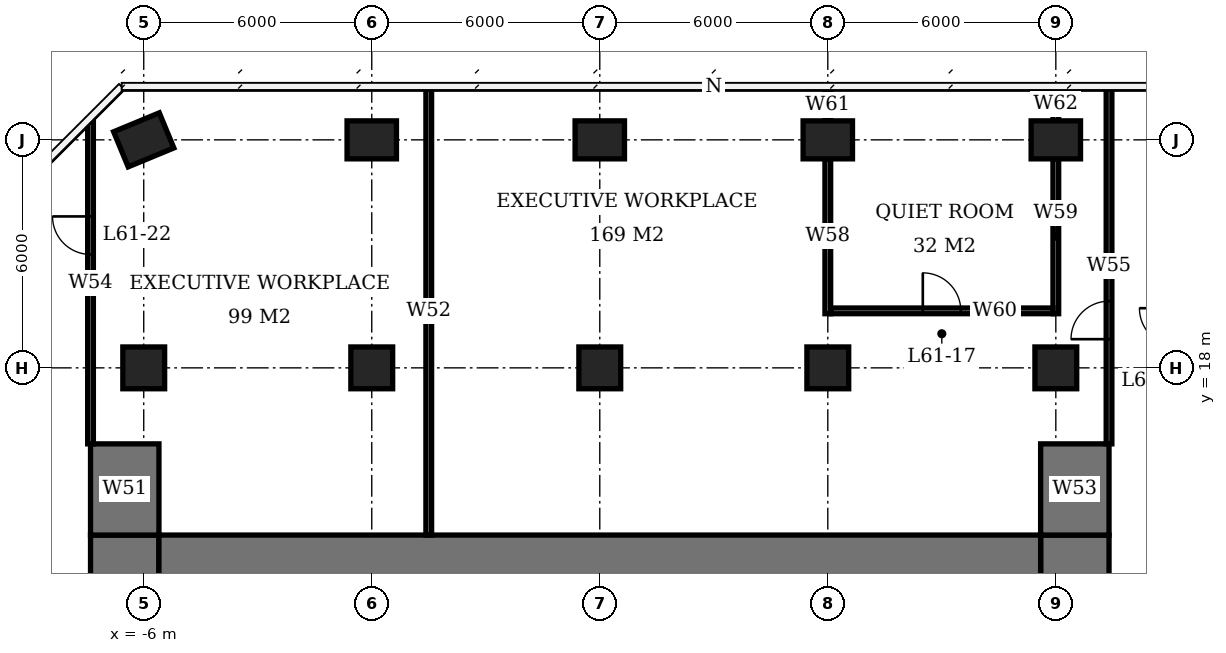
"""IFC4 building model, lengths in metres.
Left out: names, types, materials, properties, quantities, classifications, styles, units other than length and angle.
Written with IfcOpenShell. Run it as: python <this file> out.ifc"""

import sys

from ifc_helpers import new_model, si_unit, direction, frame, frame_2d, origin, origin_2d, place, context, subcontext, project, spatial, rectangle, extrude, element, fill, save


model = new_model("IFC4")
c1 = context("Model", 3, precision=1e-05, world=origin(), true_north=direction((0.0, 1.0)))
c2 = subcontext(c1, "Body", "Model", "MODEL_VIEW")
j1 = project(units=[si_unit("LENGTHUNIT", "METRE"), si_unit("PLANEANGLEUNIT", "RADIAN")], contexts=[c1])
p1 = place(None, origin())
s1 = spatial("IfcSite", under=j1, at=p1, CompositionType="ELEMENT")
p2 = place(p1, origin())
s2 = spatial("IfcBuilding", under=s1, at=p2, CompositionType="ELEMENT")
p3 = place(p2, frame((0.0, 0.0, 248.9)))
s3 = spatial("IfcBuildingStorey", under=s2, at=p3, CompositionType="ELEMENT", Elevation=248.9)
p4 = place(p3, frame((-6.0, 18.0, 0.0), z_axis=(0.0, 0.0, 1.0), x_axis=(1.0, 0.0, 0.0)))
e1 = element("IfcColumn", 1, at=p4, inside=s3, PredefinedType="COLUMN", context=c2, shape_type="SweptSolid", body=[
    extrude(rectangle(XDim=1.1, YDim=1.1, at=origin_2d()), origin(), (0.0, 0.0, 1.0), 3.9),
])
p5 = place(p3, frame((-6.0, 24.0, 0.0), z_axis=(0.0, 0.0, 1.0), x_axis=(0.923879532511, 0.382683432365, 0.0)))
e2 = element("IfcColumn", 2, at=p5, inside=s3, PredefinedType="COLUMN", context=c2, shape_type="SweptSolid", body=[
    extrude(rectangle(XDim=1.3, YDim=1.0, at=origin_2d()), origin(), (0.0, 0.0, 1.0), 3.9),
])
p6 = place(p3, frame((0.0, 18.0, 0.0), z_axis=(0.0, 0.0, 1.0), x_axis=(1.0, 0.0, 0.0)))
e3 = element("IfcColumn", 3, at=p6, inside=s3, PredefinedType="COLUMN", context=c2, shape_type="SweptSolid", body=[
    extrude(rectangle(XDim=1.1, YDim=1.1, at=origin_2d()), origin(), (0.0, 0.0, 1.0), 3.9),
])
p7 = place(p3, frame((0.0, 24.0, 0.0), z_axis=(0.0, 0.0, 1.0), x_axis=(1.0, 0.0, 0.0)))
e4 = element("IfcColumn", 4, at=p7, inside=s3, PredefinedType="COLUMN", context=c2, shape_type="SweptSolid", body=[
    extrude(rectangle(XDim=1.3, YDim=1.0, at=origin_2d()), origin(), (0.0, 0.0, 1.0), 3.9),
])
p8 = place(p3, frame((6.0, 18.0, 0.0), z_axis=(0.0, 0.0, 1.0), x_axis=(1.0, 0.0, 0.0)))
e5 = element("IfcColumn", 5, at=p8, inside=s3, PredefinedType="COLUMN", context=c2, shape_type="SweptSolid", body=[
    extrude(rectangle(XDim=1.1, YDim=1.1, at=origin_2d()), origin(), (0.0, 0.0, 1.0), 3.9),
])
p9 = place(p3, frame((6.0, 24.0, 0.0), z_axis=(0.0, 0.0, 1.0), x_axis=(1.0, 0.0, 0.0)))
e6 = element("IfcColumn", 6, at=p9, inside=s3, PredefinedType="COLUMN", context=c2, shape_type="SweptSolid", body=[
    extrude(rectangle(XDim=1.3, YDim=1.0, at=origin_2d()), origin(), (0.0, 0.0, 1.0), 3.9),
])
p10 = place(p3, frame((12.0, 18.0, 0.0), z_axis=(0.0, 0.0, 1.0), x_axis=(1.0, 0.0, 0.0)))
e7 = element("IfcColumn", 7, at=p10, inside=s3, PredefinedType="COLUMN", context=c2, shape_type="SweptSolid", body=[
    extrude(rectangle(XDim=1.1, YDim=1.1, at=origin_2d()), origin(), (0.0, 0.0, 1.0), 3.9),
])
p11 = place(p3, frame((12.0, 24.0, 0.0), z_axis=(0.0, 0.0, 1.0), x_axis=(1.0, 0.0, 0.0)))
e8 = element("IfcColumn", 8, at=p11, inside=s3, PredefinedType="COLUMN", context=c2, shape_type="SweptSolid", body=[
    extrude(rectangle(XDim=1.3, YDim=1.0, at=origin_2d()), origin(), (0.0, 0.0, 1.0), 3.9),
])
p12 = place(p3, frame((18.0, 18.0, 0.0), z_axis=(0.0, 0.0, 1.0), x_axis=(1.0, 0.0, 0.0)))
e9 = element("IfcColumn", 9, at=p12, inside=s3, PredefinedType="COLUMN", context=c2, shape_type="SweptSolid", body=[
    extrude(rectangle(XDim=1.1, YDim=1.1, at=origin_2d()), origin(), (0.0, 0.0, 1.0), 3.9),
])
p13 = place(p3, frame((18.0, 24.0, 0.0), z_axis=(0.0, 0.0, 1.0), x_axis=(1.0, 0.0, 0.0)))
e10 = element("IfcColumn", 10, at=p13, inside=s3, PredefinedType="COLUMN", context=c2, shape_type="SweptSolid", body=[
    extrude(rectangle(XDim=1.3, YDim=1.0, at=origin_2d()), origin(), (0.0, 0.0, 1.0), 3.9),
])
p14 = place(p3, frame((-5.6, 12.6, 0.0), z_axis=(0.0, 0.0, 1.0), x_axis=(1.0, 0.0, 0.0)))
e11 = element("IfcWall", 11, at=p14, inside=s3, PredefinedType="SHEAR", context=c2, shape_type="SweptSolid", body=[
    extrude(rectangle(XDim=23.2, YDim=2.0, at=frame_2d((11.6, 0.0))), origin(), (0.0, 0.0, 1.0), 3.9),
])
p15 = place(p3, frame((-6.5, -7.6, 0.0), z_axis=(0.0, 0.0, 1.0), x_axis=(0.0, 1.0, 0.0)))
e12 = element("IfcWall", 12, at=p15, inside=s3, PredefinedType="SHEAR", context=c2, shape_type="SweptSolid", body=[
    extrude(rectangle(XDim=21.2, YDim=1.8, at=frame_2d((10.6, 0.0))), origin(), (0.0, 0.0, 1.0), 3.9),
])
p16 = place(p15, frame((7.8, 0.0, 0.0)))
e13 = element("IfcOpeningElement", 13, at=p16, cuts=e12, PredefinedType="OPENING", context=c2, shape_type="SweptSolid", body=[
    extrude(rectangle(XDim=1.8, YDim=2.4, at=frame_2d((0.9, 1.2))), frame((0.0, 0.91, 0.0), z_axis=(0.0, -1.0, 0.0), x_axis=(1.0, 0.0, 0.0)), (0.0, 0.0, 1.0), 1.82),
])
p17 = place(p3, frame((18.5, -7.6, 0.0), z_axis=(0.0, 0.0, 1.0), x_axis=(0.0, 1.0, 0.0)))
e14 = element("IfcWall", 14, at=p17, inside=s3, PredefinedType="SHEAR", context=c2, shape_type="SweptSolid", body=[
    extrude(rectangle(XDim=21.2, YDim=1.8, at=frame_2d((10.6, 0.0))), origin(), (0.0, 0.0, 1.0), 3.9),
])
p18 = place(p17, frame((9.2, 0.0, 0.0)))
e15 = element("IfcOpeningElement", 15, at=p18, cuts=e14, PredefinedType="OPENING", context=c2, shape_type="SweptSolid", body=[
    extrude(rectangle(XDim=1.8, YDim=2.4, at=frame_2d((0.9, 1.2))), frame((0.0, 0.91, 0.0), z_axis=(0.0, -1.0, 0.0), x_axis=(1.0, 0.0, 0.0)), (0.0, 0.0, 1.0), 1.82),
])
for number, where, z_axis, x_axis in (
    (16, (-6.5, 13.6, 0.0), (0.0, 0.0, 1.0), (0.0, 1.0, 0.0)),
    (17, (18.5, 13.6, 0.0), (0.0, 0.0, 1.0), (0.0, 1.0, 0.0)),
):
    element("IfcWall", number, at=place(p3, frame(where, z_axis=z_axis, x_axis=x_axis)), inside=s3, PredefinedType="SHEAR", context=c2, shape_type="SweptSolid", body=[
        extrude(rectangle(XDim=2.4, YDim=1.8, at=frame_2d((1.2, 0.0))), origin(), (0.0, 0.0, 1.0), 3.9),
    ])
p19 = place(p3, frame((12.075, 19.5, 0.0), z_axis=(0.0, 0.0, 1.0), x_axis=(1.0, 0.0, 0.0)))
e18 = element("IfcWall", 18, at=p19, inside=s3, PredefinedType="PARTITIONING", context=c2, shape_type="SweptSolid", body=[
    extrude(rectangle(XDim=5.85, YDim=0.15, at=frame_2d((2.925, 0.0))), origin(), (0.0, 0.0, 1.0), 3.65),
])
p20 = place(p19, frame((2.425, 0.0, 0.0)))
e19 = element("IfcOpeningElement", 19, at=p20, cuts=e18, PredefinedType="OPENING", context=c2, shape_type="SweptSolid", body=[
    extrude(rectangle(XDim=1.0, YDim=2.4, at=frame_2d((0.5, 1.2))), frame((0.0, 0.085, 0.0), z_axis=(0.0, -1.0, 0.0), x_axis=(1.0, 0.0, 0.0)), (0.0, 0.0, 1.0), 0.17),
])
p21 = place(p3, frame((12.0, 19.425, 0.0), z_axis=(0.0, 0.0, 1.0), x_axis=(0.0, 1.0, 0.0)))
e20 = element("IfcWall", 20, at=p21, inside=s3, PredefinedType="PARTITIONING", context=c2, shape_type="SweptSolid", body=[
    extrude(rectangle(XDim=4.075, YDim=0.15, at=frame_2d((2.038, 0.0))), origin(), (0.0, 0.0, 1.0), 3.65),
])
p22 = place(p3, frame((12.0, 24.5, 0.0), z_axis=(0.0, 0.0, 1.0), x_axis=(0.0, 1.0, 0.0)))
e21 = element("IfcWall", 21, at=p22, inside=s3, PredefinedType="PARTITIONING", context=c2, shape_type="SweptSolid", body=[
    extrude(rectangle(XDim=0.85, YDim=0.15, at=frame_2d((0.425, 0.0))), origin(), (0.0, 0.0, 1.0), 3.65),
])
p23 = place(p3, frame((18.0, 19.425, 0.0), z_axis=(0.0, 0.0, 1.0), x_axis=(0.0, 1.0, 0.0)))
e22 = element("IfcWall", 22, at=p23, inside=s3, PredefinedType="PARTITIONING", context=c2, shape_type="SweptSolid", body=[
    extrude(rectangle(XDim=4.075, YDim=0.15, at=frame_2d((2.038, 0.0))), origin(), (0.0, 0.0, 1.0), 3.65),
])
p24 = place(p3, frame((18.0, 24.5, 0.0), z_axis=(0.0, 0.0, 1.0), x_axis=(0.0, 1.0, 0.0)))
e23 = element("IfcWall", 23, at=p24, inside=s3, PredefinedType="PARTITIONING", context=c2, shape_type="SweptSolid", body=[
    extrude(rectangle(XDim=0.875, YDim=0.15, at=frame_2d((0.438, 0.0))), origin(), (0.0, 0.0, 1.0), 3.65),
])
p25 = place(p3, frame((-7.4, 16.0, 0.0), z_axis=(0.0, 0.0, 1.0), x_axis=(0.0, 1.0, 0.0)))
e24 = element("IfcWall", 24, at=p25, inside=s3, PredefinedType="PARTITIONING", context=c2, shape_type="SweptSolid", body=[
    extrude(rectangle(XDim=8.464, YDim=0.15, at=frame_2d((4.232, 0.0))), origin(), (0.0, 0.0, 1.0), 3.65),
])
p26 = place(p25, frame((4.985, 0.0, 0.0)))
e25 = element("IfcOpeningElement", 25, at=p26, cuts=e24, PredefinedType="OPENING", context=c2, shape_type="SweptSolid", body=[
    extrude(rectangle(XDim=1.0, YDim=2.4, at=frame_2d((0.5, 1.2))), frame((0.0, 0.085, 0.0), z_axis=(0.0, -1.0, 0.0), x_axis=(1.0, 0.0, 0.0)), (0.0, 0.0, 1.0), 0.17),
])
p27 = place(p3, frame((1.5, 13.6, 0.0), z_axis=(0.0, 0.0, 1.0), x_axis=(0.0, 1.0, 0.0)))
e26 = element("IfcWall", 26, at=p27, inside=s3, PredefinedType="PARTITIONING", context=c2, shape_type="SweptSolid", body=[
    extrude(rectangle(XDim=11.775, YDim=0.15, at=frame_2d((5.887, 0.0))), origin(), (0.0, 0.0, 1.0), 3.65),
])
p28 = place(p3, frame((19.4, 16.0, 0.0), z_axis=(0.0, 0.0, 1.0), x_axis=(0.0, 1.0, 0.0)))
e27 = element("IfcWall", 27, at=p28, inside=s3, PredefinedType="PARTITIONING", context=c2, shape_type="SweptSolid", body=[
    extrude(rectangle(XDim=9.375, YDim=0.15, at=frame_2d((4.688, 0.0))), origin(), (0.0, 0.0, 1.0), 3.65),
])
p29 = place(p28, frame((2.755, 0.0, 0.0)))
e28 = element("IfcOpeningElement", 28, at=p29, cuts=e27, PredefinedType="OPENING", context=c2, shape_type="SweptSolid", body=[
    extrude(rectangle(XDim=1.0, YDim=2.4, at=frame_2d((0.5, 1.2))), frame((0.0, 0.085, 0.0), z_axis=(0.0, -1.0, 0.0), x_axis=(1.0, 0.0, 0.0)), (0.0, 0.0, 1.0), 0.17),
])
p30 = place(p20, origin())
e29 = element("IfcDoor", 29, at=p30, inside=s3, OperationType="SINGLE_SWING_LEFT", PredefinedType="DOOR", context=c2, shape_type="SweptSolid", body=[
    extrude(rectangle(XDim=1.0, YDim=2.4, at=frame_2d((0.5, 1.2))), frame((0.0, 0.025, 0.0), z_axis=(0.0, -1.0, 0.0), x_axis=(1.0, 0.0, 0.0)), (0.0, 0.0, 1.0), 0.05),
])
fill(e19, e29)
p31 = place(p29, origin())
e30 = element("IfcDoor", 30, at=p31, inside=s3, OperationType="SINGLE_SWING_LEFT", PredefinedType="DOOR", context=c2, shape_type="SweptSolid", body=[
    extrude(rectangle(XDim=1.0, YDim=2.4, at=frame_2d((0.5, 1.2))), frame((0.0, 0.025, 0.0), z_axis=(0.0, -1.0, 0.0), x_axis=(1.0, 0.0, 0.0)), (0.0, 0.0, 1.0), 0.05),
])
fill(e28, e30)
p32 = place(p26, origin())
e31 = element("IfcDoor", 31, at=p32, inside=s3, OperationType="SINGLE_SWING_RIGHT", PredefinedType="DOOR", context=c2, shape_type="SweptSolid", body=[
    extrude(rectangle(XDim=1.0, YDim=2.4, at=frame_2d((0.5, 1.2))), frame((0.0, 0.025, 0.0), z_axis=(0.0, -1.0, 0.0), x_axis=(1.0, 0.0, 0.0)), (0.0, 0.0, 1.0), 0.05),
])
fill(e25, e31)
save(model, sys.argv[1])
